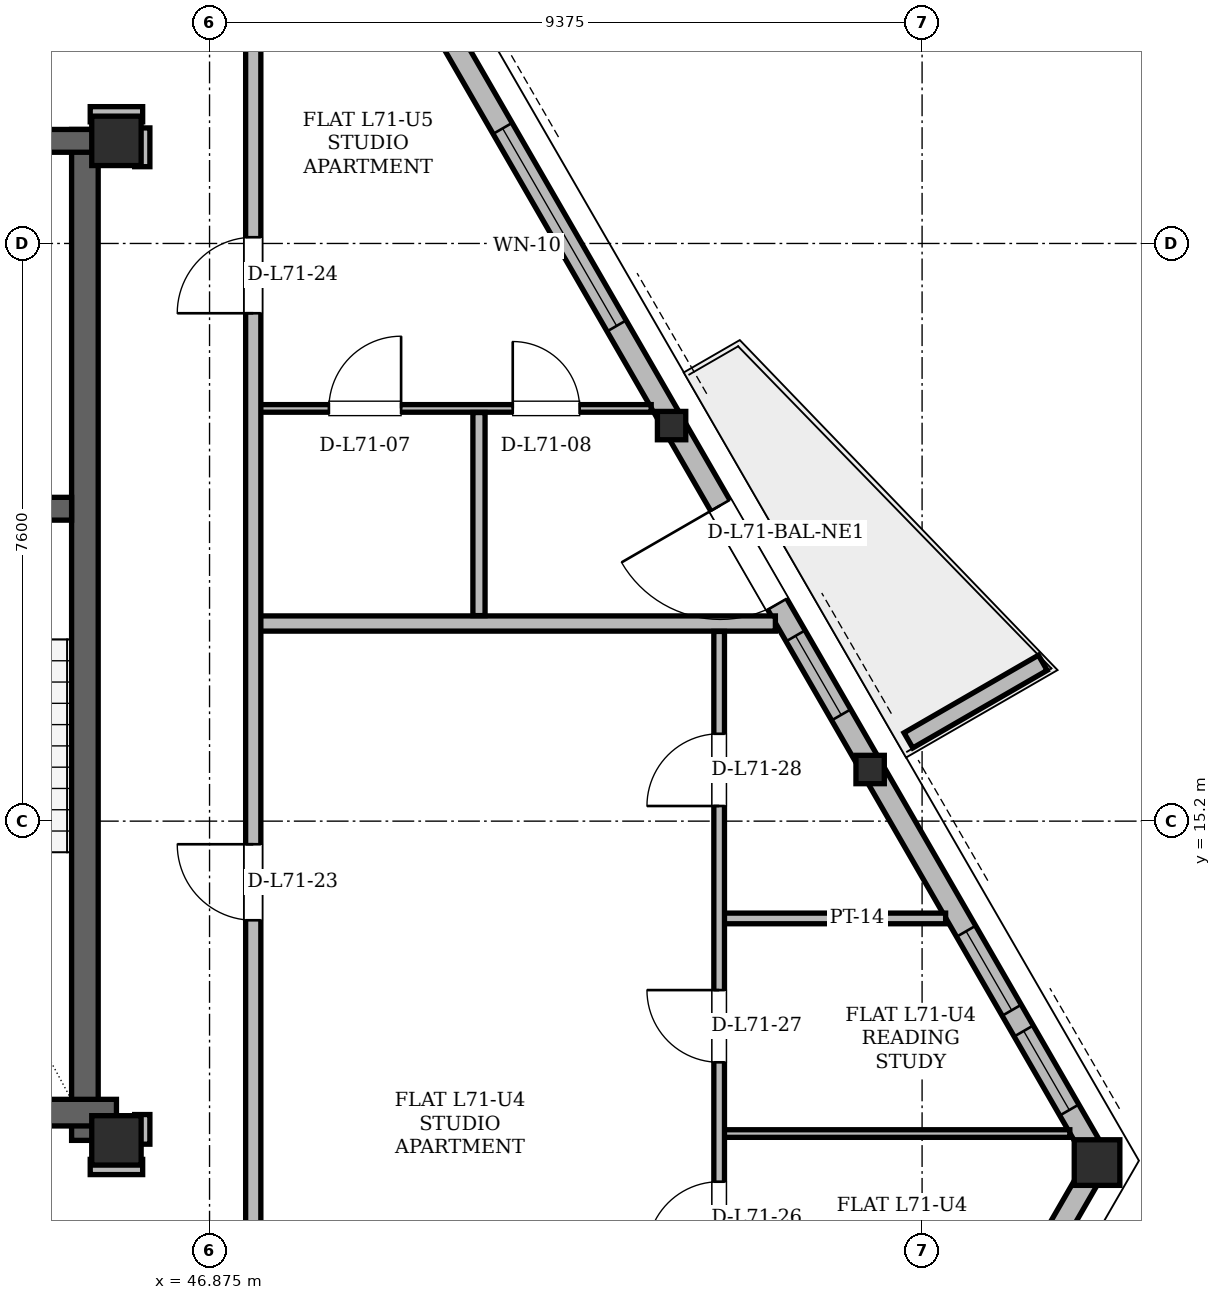
"""IFC4 building model, lengths in metres.
Left out: names, types, materials, properties, quantities, classifications, styles, units other than length and angle.
Written with IfcOpenShell. Run it as: python <this file> out.ifc"""

import sys

from ifc_helpers import new_model, si_unit, direction, frame, frame_2d, origin, origin_2d, place, context, subcontext, project, spatial, polyline, rectangle, hollow_rectangle, i_section, outline, extrude, element, fill, save


model = new_model("IFC4")
c1 = context("Model", 3, precision=1e-05, world=origin(), true_north=direction((0.0, 1.0)))
c2 = subcontext(c1, "Body", "Model", "MODEL_VIEW")
j1 = project(units=[si_unit("LENGTHUNIT", "METRE"), si_unit("PLANEANGLEUNIT", "RADIAN")], contexts=[c1])
p1 = place(None, origin())
s1 = spatial("IfcSite", under=j1, at=p1, CompositionType="ELEMENT")
p2 = place(p1, origin())
s2 = spatial("IfcBuilding", under=s1, at=p2, CompositionType="ELEMENT")
p3 = place(p2, frame((0.0, 0.0, 269.4)))
s3 = spatial("IfcBuildingStorey", under=s2, at=p3, CompositionType="ELEMENT", Elevation=269.4)
for number, where, z_axis, x_axis in (
    (1, (45.65, 11.0, 0.0), (0.0, 0.0, 1.0), (1.0, 0.0, 0.0)),
    (2, (45.65, 24.15, 0.0), (0.0, 0.0, 1.0), (1.0, 0.0, 0.0)),
):
    element("IfcColumn", number, at=place(p3, frame(where, z_axis=z_axis, x_axis=x_axis)), inside=s3, PredefinedType="COLUMN", context=c2, shape_type="SweptSolid", body=[
        extrude(hollow_rectangle(XDim=0.65, YDim=0.65, WallThickness=0.05, at=origin_2d()), origin(), (0.0, 0.0, 1.0), 3.9),
    ])
p4 = place(p3, frame((58.572, 10.733, 0.005), z_axis=(-0.010226391035, -0.012861412038, 0.99986499339), x_axis=(0.782727867859, -0.622364109566, 0.0)))
e3 = element("IfcColumn", 3, at=p4, inside=s3, PredefinedType="COLUMN", context=c2, shape_type="SweptSolid", body=[
    extrude(hollow_rectangle(XDim=0.6, YDim=0.6, WallThickness=0.045, at=origin_2d()), origin(), (0.0, 0.0, 1.0), 3.891),
])
for number, where, z_axis, x_axis in (
    (4, (55.588, 15.901, 0.005), (-0.011, -0.011, 1.0), (0.707, -0.707, 0.0)),
    (5, (52.977, 20.423, 0.005), (-0.012, -0.01, 1.0), (0.63, -0.776, 0.0)),
):
    element("IfcColumn", number, at=place(p3, frame(where, z_axis=z_axis, x_axis=x_axis)), inside=s3, PredefinedType="COLUMN", context=c2, shape_type="SweptSolid", body=[
        extrude(i_section(OverallWidth=0.373, OverallDepth=0.373, WebThickness=0.016, FlangeThickness=0.026, at=origin_2d()), origin(), (0.0, 0.0, 1.0), 3.891),
    ])
p5 = place(p3, frame((45.235, 11.0, 0.0), z_axis=(0.0, 0.0, 1.0), x_axis=(0.0, 1.0, 0.0)))
e6 = element("IfcWall", 6, at=p5, inside=s3, PredefinedType="SHEAR", context=c2, shape_type="SweptSolid", body=[
    extrude(rectangle(XDim=13.3, YDim=0.35, at=frame_2d((6.65, 0.0))), origin(), (0.0, 0.0, 1.0), 3.68),
])
p6 = place(p3, frame((38.55, 11.365, 0.0), z_axis=(0.0, 0.0, 1.0), x_axis=(1.0, 0.0, 0.0)))
e7 = element("IfcWall", 7, at=p6, inside=s3, PredefinedType="SHEAR", context=c2, shape_type="SweptSolid", body=[
    extrude(rectangle(XDim=7.1, YDim=0.35, at=frame_2d((3.55, 0.0))), origin(), (0.0, 0.0, 1.0), 3.68),
])
p7 = place(p3, frame((29.65, 24.15, 0.0), z_axis=(0.0, 0.0, 1.0), x_axis=(1.0, 0.0, 0.0)))
e8 = element("IfcWall", 8, at=p7, inside=s3, PredefinedType="SHEAR", context=c2, shape_type="SweptSolid", body=[
    extrude(rectangle(XDim=15.7, YDim=0.3, at=frame_2d((7.85, 0.0))), origin(), (0.0, 0.0, 1.0), 3.68),
])
p8 = place(p7, frame((1.7, 0.0, 0.0)))
e9 = element("IfcOpeningElement", 9, at=p8, cuts=e8, PredefinedType="OPENING", context=c2, shape_type="SweptSolid", body=[
    extrude(rectangle(XDim=1.2, YDim=2.2, at=frame_2d((0.6, 1.1))), frame((0.0, 0.15, 0.0), z_axis=(0.0, -1.0, 0.0), x_axis=(1.0, 0.0, 0.0)), (0.0, 0.0, 1.0), 0.3),
])
p9 = place(p7, frame((12.8, 0.0, 0.0)))
e10 = element("IfcOpeningElement", 10, at=p9, cuts=e8, PredefinedType="OPENING", context=c2, shape_type="SweptSolid", body=[
    extrude(rectangle(XDim=1.2, YDim=2.2, at=frame_2d((0.6, 1.1))), frame((0.0, 0.15, 0.0), z_axis=(0.0, -1.0, 0.0), x_axis=(1.0, 0.0, 0.0)), (0.0, 0.0, 1.0), 0.3),
])
p10 = place(p7, frame((7.4, 0.0, 0.0)))
e11 = element("IfcOpeningElement", 11, at=p10, cuts=e8, PredefinedType="OPENING", context=c2, shape_type="SweptSolid", body=[
    extrude(rectangle(XDim=0.9, YDim=2.05, at=frame_2d((0.45, 1.025))), frame((0.0, 0.15, 0.0), z_axis=(0.0, -1.0, 0.0), x_axis=(1.0, 0.0, 0.0)), (0.0, 0.0, 1.0), 0.3),
])
p11 = place(p3, frame((41.05, 19.31, 0.0), z_axis=(0.0, 0.0, 1.0), x_axis=(1.0, 0.0, 0.0)))
e12 = element("IfcWall", 12, at=p11, inside=s3, PredefinedType="SHEAR", context=c2, shape_type="SweptSolid", body=[
    extrude(rectangle(XDim=4.01, YDim=0.3, at=frame_2d((2.005, 0.0))), origin(), (0.0, 0.0, 1.0), 3.68),
])
p12 = place(p11, frame((1.6, 0.0, 0.0)))
e13 = element("IfcOpeningElement", 13, at=p12, cuts=e12, PredefinedType="OPENING", context=c2, shape_type="SweptSolid", body=[
    extrude(rectangle(XDim=1.4, YDim=2.2, at=frame_2d((0.7, 1.1))), frame((0.0, 0.15, 0.0), z_axis=(0.0, -1.0, 0.0), x_axis=(1.0, 0.0, 0.0)), (0.0, 0.0, 1.0), 0.3),
])
p13 = place(p3, frame((56.148, 6.535, 0.0), z_axis=(0.0, 0.0, 1.0), x_axis=(0.499973841066, 0.866040506125, 0.0)))
e14 = element("IfcWall", 14, at=p13, inside=s3, PredefinedType="SOLIDWALL", context=c2, shape_type="SweptSolid", body=[
    extrude(rectangle(XDim=4.848, YDim=0.29, at=frame_2d((2.424, 0.0))), origin(), (0.0, 0.0, 1.0), 3.058),
])
p14 = place(p3, frame((58.572, 10.733, 0.0), z_axis=(0.0, 0.0, 1.0), x_axis=(-0.500001430823, 0.866024577697, 0.0)))
e15 = element("IfcWall", 15, at=p14, inside=s3, PredefinedType="SOLIDWALL", context=c2, shape_type="SweptSolid", body=[
    extrude(rectangle(XDim=37.296, YDim=0.29, at=frame_2d((18.648, 0.0))), origin(), (0.0, 0.0, 1.0), 3.058),
])
p15 = place(p14, frame((8.454, 0.0, 0.0)))
e16 = element("IfcOpeningElement", 16, at=p15, cuts=e15, PredefinedType="OPENING", context=c2, shape_type="SweptSolid", body=[
    extrude(rectangle(XDim=1.5, YDim=2.2, at=frame_2d((0.75, 1.1))), frame((0.0, 0.145, 0.0), z_axis=(0.0, -1.0, 0.0), x_axis=(1.0, 0.0, 0.0)), (0.0, 0.0, 1.0), 0.29),
])
p16 = place(p14, frame((28.796, 0.0, 0.0)))
e17 = element("IfcOpeningElement", 17, at=p16, cuts=e15, PredefinedType="OPENING", context=c2, shape_type="SweptSolid", body=[
    extrude(rectangle(XDim=1.5, YDim=2.2, at=frame_2d((0.75, 1.1))), frame((0.0, 0.145, 0.0), z_axis=(0.0, -1.0, 0.0), x_axis=(1.0, 0.0, 0.0)), (0.0, 0.0, 1.0), 0.29),
])
p17 = place(p14, frame((0.77, 0.0, 0.85)))
e18 = element("IfcOpeningElement", 18, at=p17, cuts=e15, PredefinedType="OPENING", context=c2, shape_type="SweptSolid", body=[
    extrude(rectangle(XDim=1.2, YDim=1.48, at=frame_2d((0.6, 0.74))), frame((0.0, 0.145, 0.0), z_axis=(0.0, -1.0, 0.0), x_axis=(1.0, 0.0, 0.0)), (0.0, 0.0, 1.0), 0.29),
])
p18 = place(p14, frame((2.285, 0.0, 0.85)))
e19 = element("IfcOpeningElement", 19, at=p18, cuts=e15, PredefinedType="OPENING", context=c2, shape_type="SweptSolid", body=[
    extrude(rectangle(XDim=1.2, YDim=1.48, at=frame_2d((0.6, 0.74))), frame((0.0, 0.145, 0.0), z_axis=(0.0, -1.0, 0.0), x_axis=(1.0, 0.0, 0.0)), (0.0, 0.0, 1.0), 0.29),
])
p19 = place(p14, frame((6.772, 0.0, 0.85)))
e20 = element("IfcOpeningElement", 20, at=p19, cuts=e15, PredefinedType="OPENING", context=c2, shape_type="SweptSolid", body=[
    extrude(rectangle(XDim=1.2, YDim=1.48, at=frame_2d((0.6, 0.74))), frame((0.0, 0.145, 0.0), z_axis=(0.0, -1.0, 0.0), x_axis=(1.0, 0.0, 0.0)), (0.0, 0.0, 1.0), 0.29),
])
p20 = place(p14, frame((12.682, 0.0, 0.85)))
e21 = element("IfcOpeningElement", 21, at=p20, cuts=e15, PredefinedType="OPENING", context=c2, shape_type="SweptSolid", body=[
    extrude(rectangle(XDim=3.0, YDim=2.098, at=frame_2d((1.5, 1.049))), frame((0.0, 0.145, 0.0), z_axis=(0.0, -1.0, 0.0), x_axis=(1.0, 0.0, 0.0)), (0.0, 0.0, 1.0), 0.29),
])
p21 = place(p14, frame((17.842, 0.0, 0.85)))
e22 = element("IfcOpeningElement", 22, at=p21, cuts=e15, PredefinedType="OPENING", context=c2, shape_type="SweptSolid", body=[
    extrude(rectangle(XDim=2.6, YDim=1.95, at=frame_2d((1.3, 0.975))), frame((0.0, 0.145, 0.0), z_axis=(0.0, -1.0, 0.0), x_axis=(1.0, 0.0, 0.0)), (0.0, 0.0, 1.0), 0.29),
])
p22 = place(p14, frame((35.217, 0.0, 0.85)))
e23 = element("IfcOpeningElement", 23, at=p22, cuts=e15, PredefinedType="OPENING", context=c2, shape_type="SweptSolid", body=[
    extrude(rectangle(XDim=1.2, YDim=1.48, at=frame_2d((0.6, 0.74))), frame((0.0, 0.145, 0.0), z_axis=(0.0, -1.0, 0.0), x_axis=(1.0, 0.0, 0.0)), (0.0, 0.0, 1.0), 0.29),
])
p23 = place(p14, frame((33.737, 0.0, 0.85)))
e24 = element("IfcOpeningElement", 24, at=p23, cuts=e15, PredefinedType="OPENING", context=c2, shape_type="SweptSolid", body=[
    extrude(rectangle(XDim=1.2, YDim=1.48, at=frame_2d((0.6, 0.74))), frame((0.0, 0.145, 0.0), z_axis=(0.0, -1.0, 0.0), x_axis=(1.0, 0.0, 0.0)), (0.0, 0.0, 1.0), 0.29),
])
p24 = place(p14, frame((22.775, 0.0, 0.85)))
e25 = element("IfcOpeningElement", 25, at=p24, cuts=e15, PredefinedType="OPENING", context=c2, shape_type="SweptSolid", body=[
    extrude(rectangle(XDim=1.2, YDim=1.48, at=frame_2d((0.6, 0.74))), frame((0.0, 0.145, 0.0), z_axis=(0.0, -1.0, 0.0), x_axis=(1.0, 0.0, 0.0)), (0.0, 0.0, 1.0), 0.29),
])
p25 = place(p14, frame((31.663, 0.0, 0.85)))
e26 = element("IfcOpeningElement", 26, at=p25, cuts=e15, PredefinedType="OPENING", context=c2, shape_type="SweptSolid", body=[
    extrude(rectangle(XDim=1.2, YDim=1.48, at=frame_2d((0.6, 0.74))), frame((0.0, 0.145, 0.0), z_axis=(0.0, -1.0, 0.0), x_axis=(1.0, 0.0, 0.0)), (0.0, 0.0, 1.0), 0.29),
])
p26 = place(p3, frame((56.07, 16.262, 0.0), z_axis=(0.0, 0.0, 1.0), x_axis=(0.866012356593, 0.500022597718, 0.0)))
e27 = element("IfcWall", 27, at=p26, inside=s3, PredefinedType="PARAPET", context=c2, shape_type="SweptSolid", body=[
    extrude(outline(polyline([(0.0, 0.0), (2.042, 0.0), (2.042, 1.1), (0.0, 1.32), (0.0, 0.0)])), frame((0.0, 0.115, 0.0), z_axis=(0.0, -1.0, 0.0), x_axis=(1.0, 0.0, 0.0)), (0.0, 0.0, 1.0), 0.23),
])
p27 = place(p3, frame((45.305, 10.65, 0.0), z_axis=(0.0, 0.0, 1.0), x_axis=(1.0, 0.0, 0.0)))
e28 = element("IfcWall", 28, at=p27, inside=s3, PredefinedType="PARTITIONING", context=c2, shape_type="SweptSolid", body=[
    extrude(rectangle(XDim=0.69, YDim=0.2, at=frame_2d((0.345, 0.0))), origin(), (0.0, 0.0, 1.0), 3.68),
])
p28 = place(p3, frame((53.581, 11.09, 0.0), z_axis=(0.0, 0.0, 1.0), x_axis=(1.0, 0.0, 0.0)))
e29 = element("IfcWall", 29, at=p28, inside=s3, PredefinedType="PARTITIONING", context=c2, shape_type="SweptSolid", body=[
    extrude(rectangle(XDim=4.612, YDim=0.1, at=frame_2d((2.306, 0.0))), origin(), (0.0, 0.0, 1.0), 3.68),
])
p29 = place(p3, frame((53.581, 13.92, 0.0), z_axis=(0.0, 0.0, 1.0), x_axis=(1.0, 0.0, 0.0)))
e30 = element("IfcWall", 30, at=p29, inside=s3, PredefinedType="PARTITIONING", context=c2, shape_type="SweptSolid", body=[
    extrude(rectangle(XDim=2.979, YDim=0.14, at=frame_2d((1.489, 0.0))), origin(), (0.0, 0.0, 1.0), 3.68),
])
p30 = place(p3, frame((47.45, 17.8, 0.0), z_axis=(0.0, 0.0, 1.0), x_axis=(1.0, 0.0, 0.0)))
e31 = element("IfcWall", 31, at=p30, inside=s3, PredefinedType="PARTITIONING", context=c2, shape_type="SweptSolid", body=[
    extrude(rectangle(XDim=6.87, YDim=0.2, at=frame_2d((3.435, 0.0))), origin(), (0.0, 0.0, 1.0), 3.68),
])
p31 = place(p3, frame((47.4, 20.63, 0.0), z_axis=(0.0, 0.0, 1.0), x_axis=(1.0, 0.0, 0.0)))
e32 = element("IfcWall", 32, at=p31, inside=s3, PredefinedType="PARTITIONING", context=c2, shape_type="SweptSolid", body=[
    extrude(rectangle(XDim=5.286, YDim=0.1, at=frame_2d((2.643, 0.0))), origin(), (0.0, 0.0, 1.0), 3.68),
])
p32 = place(p31, frame((1.045, 0.0, 0.0)))
e33 = element("IfcOpeningElement", 33, at=p32, cuts=e32, PredefinedType="OPENING", context=c2, shape_type="SweptSolid", body=[
    extrude(rectangle(XDim=0.95, YDim=2.1, at=frame_2d((0.475, 1.05))), frame((0.0, 0.05, 0.0), z_axis=(0.0, -1.0, 0.0), x_axis=(1.0, 0.0, 0.0)), (0.0, 0.0, 1.0), 0.1),
])
p33 = place(p31, frame((3.464, 0.0, 0.0)))
e34 = element("IfcOpeningElement", 34, at=p33, cuts=e32, PredefinedType="OPENING", context=c2, shape_type="SweptSolid", body=[
    extrude(rectangle(XDim=0.88, YDim=2.08, at=frame_2d((0.44, 1.04))), frame((0.0, 0.05, 0.0), z_axis=(0.0, -1.0, 0.0), x_axis=(1.0, 0.0, 0.0)), (0.0, 0.0, 1.0), 0.1),
])
p34 = place(p3, frame((45.305, 24.5, 0.0), z_axis=(0.0, 0.0, 1.0), x_axis=(1.0, 0.0, 0.0)))
e35 = element("IfcWall", 35, at=p34, inside=s3, PredefinedType="PARTITIONING", context=c2, shape_type="SweptSolid", body=[
    extrude(rectangle(XDim=0.69, YDim=0.2, at=frame_2d((0.345, 0.0))), origin(), (0.0, 0.0, 1.0), 3.266),
])
p35 = place(p3, frame((45.99, 10.95, 0.0), z_axis=(0.0, 0.0, 1.0), x_axis=(0.0, 1.0, 0.0)))
e36 = element("IfcWall", 36, at=p35, inside=s3, PredefinedType="PARTITIONING", context=c2, shape_type="SweptSolid", body=[
    extrude(rectangle(XDim=0.39, YDim=0.2, at=frame_2d((0.195, 0.0))), origin(), (0.0, 0.0, 1.0), 3.68),
])
p36 = place(p3, frame((45.99, 23.81, 0.0), z_axis=(0.0, 0.0, 1.0), x_axis=(0.0, 1.0, 0.0)))
e37 = element("IfcWall", 37, at=p36, inside=s3, PredefinedType="PARTITIONING", context=c2, shape_type="SweptSolid", body=[
    extrude(rectangle(XDim=0.51, YDim=0.2, at=frame_2d((0.255, 0.0))), origin(), (0.0, 0.0, 1.0), 3.68),
])
p37 = place(p3, frame((47.45, 6.684, 0.0), z_axis=(0.0, 0.0, 1.0), x_axis=(0.0, 1.0, 0.0)))
e38 = element("IfcWall", 38, at=p37, inside=s3, PredefinedType="PARTITIONING", context=c2, shape_type="SweptSolid", body=[
    extrude(rectangle(XDim=23.015, YDim=0.2, at=frame_2d((11.507, 0.0))), origin(), (0.0, 0.0, 1.0), 3.058),
])
p38 = place(p37, frame((7.212, 0.0, 0.0)))
e39 = element("IfcOpeningElement", 39, at=p38, cuts=e38, PredefinedType="OPENING", context=c2, shape_type="SweptSolid", body=[
    extrude(rectangle(XDim=1.0, YDim=2.18, at=frame_2d((0.5, 1.09))), frame((0.0, 0.1, 0.0), z_axis=(0.0, -1.0, 0.0), x_axis=(1.0, 0.0, 0.0)), (0.0, 0.0, 1.0), 0.2),
])
p39 = place(p37, frame((15.198, 0.0, 0.0)))
e40 = element("IfcOpeningElement", 40, at=p39, cuts=e38, PredefinedType="OPENING", context=c2, shape_type="SweptSolid", body=[
    extrude(rectangle(XDim=1.0, YDim=2.18, at=frame_2d((0.5, 1.09))), frame((0.0, 0.1, 0.0), z_axis=(0.0, -1.0, 0.0), x_axis=(1.0, 0.0, 0.0)), (0.0, 0.0, 1.0), 0.2),
])
p40 = place(p3, frame((50.42, 17.904, 0.0), z_axis=(0.0, 0.0, 1.0), x_axis=(0.0, 1.0, 0.0)))
e41 = element("IfcWall", 41, at=p40, inside=s3, PredefinedType="PARTITIONING", context=c2, shape_type="SweptSolid", body=[
    extrude(rectangle(XDim=2.672, YDim=0.16, at=frame_2d((1.336, 0.0))), origin(), (0.0, 0.0, 1.0), 3.68),
])
p41 = place(p3, frame((53.58, 6.684, 0.0), z_axis=(0.0, 0.0, 1.0), x_axis=(0.0, 1.0, 0.0)))
e42 = element("IfcWall", 42, at=p41, inside=s3, PredefinedType="PARTITIONING", context=c2, shape_type="SweptSolid", body=[
    extrude(rectangle(XDim=11.012, YDim=0.14, at=frame_2d((5.506, 0.0))), origin(), (0.0, 0.0, 1.0), 3.266),
])
p42 = place(p41, frame((0.642, 0.0, 0.0)))
e43 = element("IfcOpeningElement", 43, at=p42, cuts=e42, PredefinedType="OPENING", context=c2, shape_type="SweptSolid", body=[
    extrude(rectangle(XDim=0.88, YDim=2.08, at=frame_2d((0.44, 1.04))), frame((0.0, 0.07, 0.0), z_axis=(0.0, -1.0, 0.0), x_axis=(1.0, 0.0, 0.0)), (0.0, 0.0, 1.0), 0.14),
])
p43 = place(p41, frame((2.823, 0.0, 0.0)))
e44 = element("IfcOpeningElement", 44, at=p43, cuts=e42, PredefinedType="OPENING", context=c2, shape_type="SweptSolid", body=[
    extrude(rectangle(XDim=0.95, YDim=2.1, at=frame_2d((0.475, 1.05))), frame((0.0, 0.07, 0.0), z_axis=(0.0, -1.0, 0.0), x_axis=(1.0, 0.0, 0.0)), (0.0, 0.0, 1.0), 0.14),
])
p44 = place(p41, frame((5.344, 0.0, 0.0)))
e45 = element("IfcOpeningElement", 45, at=p44, cuts=e42, PredefinedType="OPENING", context=c2, shape_type="SweptSolid", body=[
    extrude(rectangle(XDim=0.95, YDim=2.1, at=frame_2d((0.475, 1.05))), frame((0.0, 0.07, 0.0), z_axis=(0.0, -1.0, 0.0), x_axis=(1.0, 0.0, 0.0)), (0.0, 0.0, 1.0), 0.14),
])
p45 = place(p41, frame((8.716, 0.0, 0.0)))
e46 = element("IfcOpeningElement", 46, at=p45, cuts=e42, PredefinedType="OPENING", context=c2, shape_type="SweptSolid", body=[
    extrude(rectangle(XDim=0.95, YDim=2.1, at=frame_2d((0.475, 1.05))), frame((0.0, 0.07, 0.0), z_axis=(0.0, -1.0, 0.0), x_axis=(1.0, 0.0, 0.0)), (0.0, 0.0, 1.0), 0.14),
])
p46 = place(p15, origin())
e47 = element("IfcDoor", 47, at=p46, inside=s3, OperationType="SINGLE_SWING_RIGHT", PredefinedType="DOOR", context=c2, shape_type="SweptSolid", body=[
    extrude(rectangle(XDim=1.5, YDim=2.2, at=frame_2d((0.75, 1.1))), frame((0.0, 0.025, 0.0), z_axis=(0.0, -1.0, 0.0), x_axis=(1.0, 0.0, 0.0)), (0.0, 0.0, 1.0), 0.05),
])
fill(e16, e47)
p47 = place(p17, origin())
e48 = element("IfcWindow", 48, at=p47, inside=s3, PartitioningType="SINGLE_PANEL", PredefinedType="WINDOW", context=c2, shape_type="SweptSolid", body=[
    extrude(rectangle(XDim=1.2, YDim=1.48, at=frame_2d((0.6, 0.74))), frame((0.0, 0.03, 0.0), z_axis=(0.0, -1.0, 0.0), x_axis=(1.0, 0.0, 0.0)), (0.0, 0.0, 1.0), 0.06),
])
fill(e18, e48)
p48 = place(p18, origin())
e49 = element("IfcWindow", 49, at=p48, inside=s3, PartitioningType="SINGLE_PANEL", PredefinedType="WINDOW", context=c2, shape_type="SweptSolid", body=[
    extrude(rectangle(XDim=1.2, YDim=1.48, at=frame_2d((0.6, 0.74))), frame((0.0, 0.03, 0.0), z_axis=(0.0, -1.0, 0.0), x_axis=(1.0, 0.0, 0.0)), (0.0, 0.0, 1.0), 0.06),
])
fill(e19, e49)
p49 = place(p19, origin())
e50 = element("IfcWindow", 50, at=p49, inside=s3, PartitioningType="SINGLE_PANEL", PredefinedType="WINDOW", context=c2, shape_type="SweptSolid", body=[
    extrude(rectangle(XDim=1.2, YDim=1.48, at=frame_2d((0.6, 0.74))), frame((0.0, 0.03, 0.0), z_axis=(0.0, -1.0, 0.0), x_axis=(1.0, 0.0, 0.0)), (0.0, 0.0, 1.0), 0.06),
])
fill(e20, e50)
p50 = place(p20, origin())
e51 = element("IfcWindow", 51, at=p50, inside=s3, PartitioningType="SINGLE_PANEL", PredefinedType="WINDOW", context=c2, shape_type="SweptSolid", body=[
    extrude(rectangle(XDim=3.0, YDim=2.098, at=frame_2d((1.5, 1.049))), frame((0.0, 0.03, 0.0), z_axis=(0.0, -1.0, 0.0), x_axis=(1.0, 0.0, 0.0)), (0.0, 0.0, 1.0), 0.06),
])
fill(e21, e51)
p51 = place(p32, origin())
e52 = element("IfcDoor", 52, at=p51, inside=s3, OperationType="SINGLE_SWING_RIGHT", PredefinedType="DOOR", context=c2, shape_type="SweptSolid", body=[
    extrude(rectangle(XDim=0.95, YDim=2.1, at=frame_2d((0.475, 1.05))), frame((0.0, 0.025, 0.0), z_axis=(0.0, -1.0, 0.0), x_axis=(1.0, 0.0, 0.0)), (0.0, 0.0, 1.0), 0.05),
])
fill(e33, e52)
p52 = place(p33, origin())
e53 = element("IfcDoor", 53, at=p52, inside=s3, OperationType="SINGLE_SWING_LEFT", PredefinedType="DOOR", context=c2, shape_type="SweptSolid", body=[
    extrude(rectangle(XDim=0.88, YDim=2.08, at=frame_2d((0.44, 1.04))), frame((0.0, 0.025, 0.0), z_axis=(0.0, -1.0, 0.0), x_axis=(1.0, 0.0, 0.0)), (0.0, 0.0, 1.0), 0.05),
])
fill(e34, e53)
p53 = place(p38, origin())
e54 = element("IfcDoor", 54, at=p53, inside=s3, OperationType="SINGLE_SWING_RIGHT", PredefinedType="DOOR", context=c2, shape_type="SweptSolid", body=[
    extrude(rectangle(XDim=1.0, YDim=2.18, at=frame_2d((0.5, 1.09))), frame((0.0, 0.025, 0.0), z_axis=(0.0, -1.0, 0.0), x_axis=(1.0, 0.0, 0.0)), (0.0, 0.0, 1.0), 0.05),
])
fill(e39, e54)
p54 = place(p39, origin())
e55 = element("IfcDoor", 55, at=p54, inside=s3, OperationType="SINGLE_SWING_LEFT", PredefinedType="DOOR", context=c2, shape_type="SweptSolid", body=[
    extrude(rectangle(XDim=1.0, YDim=2.18, at=frame_2d((0.5, 1.09))), frame((0.0, 0.025, 0.0), z_axis=(0.0, -1.0, 0.0), x_axis=(1.0, 0.0, 0.0)), (0.0, 0.0, 1.0), 0.05),
])
fill(e40, e55)
p55 = place(p43, origin())
e56 = element("IfcDoor", 56, at=p55, inside=s3, OperationType="SINGLE_SWING_LEFT", PredefinedType="DOOR", context=c2, shape_type="SweptSolid", body=[
    extrude(rectangle(XDim=0.95, YDim=2.1, at=frame_2d((0.475, 1.05))), frame((0.0, 0.025, 0.0), z_axis=(0.0, -1.0, 0.0), x_axis=(1.0, 0.0, 0.0)), (0.0, 0.0, 1.0), 0.05),
])
fill(e44, e56)
p56 = place(p44, origin())
e57 = element("IfcDoor", 57, at=p56, inside=s3, OperationType="SINGLE_SWING_RIGHT", PredefinedType="DOOR", context=c2, shape_type="SweptSolid", body=[
    extrude(rectangle(XDim=0.95, YDim=2.1, at=frame_2d((0.475, 1.05))), frame((0.0, 0.025, 0.0), z_axis=(0.0, -1.0, 0.0), x_axis=(1.0, 0.0, 0.0)), (0.0, 0.0, 1.0), 0.05),
])
fill(e45, e57)
p57 = place(p45, origin())
e58 = element("IfcDoor", 58, at=p57, inside=s3, OperationType="SINGLE_SWING_LEFT", PredefinedType="DOOR", context=c2, shape_type="SweptSolid", body=[
    extrude(rectangle(XDim=0.95, YDim=2.1, at=frame_2d((0.475, 1.05))), frame((0.0, 0.025, 0.0), z_axis=(0.0, -1.0, 0.0), x_axis=(1.0, 0.0, 0.0)), (0.0, 0.0, 1.0), 0.05),
])
fill(e46, e58)
save(model, sys.argv[1])
